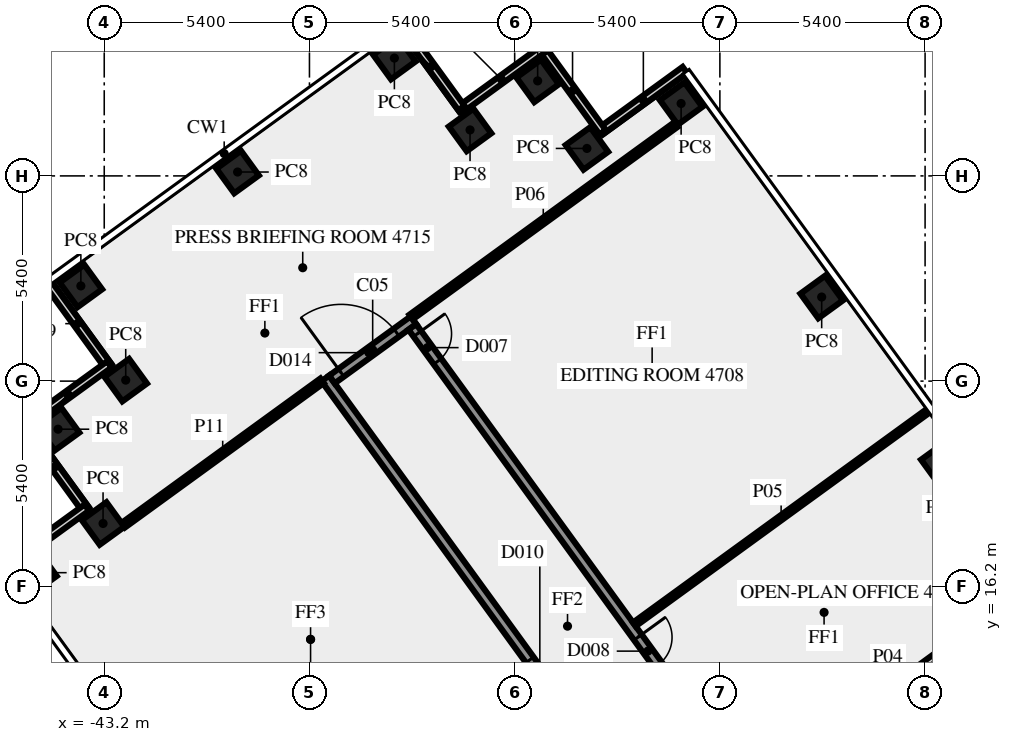
"""IFC4 building model, lengths in metres.
Left out: names, types, materials, properties, quantities, classifications, styles, units other than length and angle.
Written with IfcOpenShell. Run it as: python <this file> out.ifc"""

import sys

from ifc_helpers import new_model, si_unit, direction, frame, frame_2d, origin, origin_2d, place, context, subcontext, project, spatial, rectangle, extrude, element, fill, save


model = new_model("IFC4")
c1 = context("Model", 3, precision=1e-05, world=origin(), true_north=direction((0.0, 1.0)))
c2 = subcontext(c1, "Body", "Model", "MODEL_VIEW")
j1 = project(units=[si_unit("LENGTHUNIT", "METRE"), si_unit("PLANEANGLEUNIT", "RADIAN")], contexts=[c1])
p1 = place(None, origin())
s1 = spatial("IfcSite", under=j1, at=p1, CompositionType="ELEMENT")
p2 = place(p1, origin())
s2 = spatial("IfcBuilding", under=s1, at=p2, CompositionType="ELEMENT")
p3 = place(p2, frame((0.0, 0.0, 202.0)))
s3 = spatial("IfcBuildingStorey", under=s2, at=p3, CompositionType="ELEMENT", Elevation=202.0)
for number, where, z_axis, x_axis in (
    (1, (-21.147, 19.444, 0.0), (0.0, 0.0, 1.0), (-0.588, 0.809, 0.0)),
    (2, (-24.321, 23.812, 0.0), (0.0, 0.0, 1.0), (-0.588, 0.809, 0.0)),
    (3, (-28.02, 28.905, 0.0), (0.0, 0.0, 1.0), (-0.809, -0.588, 0.0)),
    (4, (-30.499, 27.723, 0.0), (0.0, 0.0, 1.0), (-0.809, -0.588, 0.0)),
    (5, (-31.795, 29.5, 0.0), (0.0, 0.0, 1.0), (-0.588, 0.809, 0.0)),
    (6, (-33.574, 28.209, 0.0), (0.0, 0.0, 1.0), (-0.588, 0.809, 0.0)),
    (7, (-35.565, 30.1, 0.0), (0.0, 0.0, 1.0), (-0.809, -0.588, 0.0)),
    (8, (-39.691, 27.102, 0.0), (0.0, 0.0, 1.0), (-0.809, -0.588, 0.0)),
    (9, (-43.815, 24.105, 0.0), (0.0, 0.0, 1.0), (-0.809, -0.588, 0.0)),
    (10, (-42.635, 21.626, 0.0), (0.0, 0.0, 1.0), (-0.809, -0.588, 0.0)),
    (11, (-44.415, 20.335, 0.0), (0.0, 0.0, 1.0), (0.588, -0.809, 0.0)),
    (12, (-43.231, 17.854, 0.0), (0.0, 0.0, 1.0), (0.588, -0.809, 0.0)),
    (13, (-45.01, 16.56, 0.0), (0.0, 0.0, 1.0), (0.588, -0.809, 0.0)),
):
    element("IfcColumn", number, at=place(p3, frame(where, z_axis=z_axis, x_axis=x_axis)), inside=s3, PredefinedType="COLUMN", context=c2, shape_type="SweptSolid", body=[
        extrude(rectangle(XDim=0.8, YDim=0.8, at=origin_2d()), origin(), (0.0, 0.0, 1.0), 3.65),
    ])
for number, where, z_axis, x_axis in (
    (14, (-27.921, 29.787, 0.0), (0.0, 0.0, 1.0), (-0.809, -0.588, 0.0)),
    (15, (-30.083, 28.149, 0.0), (0.0, 0.0, 1.0), (-0.588, 0.809, 0.0)),
    (16, (-31.654, 30.331, 0.0), (0.0, 0.0, 1.0), (-0.809, -0.588, 0.0)),
    (17, (-33.801, 28.786, 0.0), (0.0, 0.0, 1.0), (-0.588, 0.809, 0.0)),
    (18, (-44.699, 24.205, 0.0), (0.0, 0.0, 1.0), (0.588, -0.809, 0.0)),
    (19, (-43.061, 22.043, 0.0), (0.0, 0.0, 1.0), (-0.809, -0.588, 0.0)),
    (20, (-45.296, 20.434, 0.0), (0.0, 0.0, 1.0), (0.588, -0.809, 0.0)),
    (21, (-43.658, 18.272, 0.0), (0.0, 0.0, 1.0), (-0.809, -0.588, 0.0)),
):
    element("IfcWall", number, at=place(p3, frame(where, z_axis=z_axis, x_axis=x_axis)), inside=s3, PredefinedType="SOLIDWALL", context=c2, shape_type="SweptSolid", body=[
        extrude(rectangle(XDim=2.7, YDim=0.2, at=frame_2d((1.35, 0.0))), origin(), (0.0, 0.0, 1.0), 3.65),
    ])
p4 = place(p3, frame((-20.531, -1.523, 0.0), z_axis=(0.0, 0.0, 1.0), x_axis=(-0.587785812891, 0.809016587076, 0.0)))
e22 = element("IfcWall", 22, at=p4, inside=s3, PredefinedType="SOLIDWALL", context=c2, shape_type="SweptSolid", body=[
    extrude(rectangle(XDim=28.67, YDim=0.25, at=frame_2d((14.335, 0.0))), origin(), (0.0, 0.0, 1.0), 3.65),
])
p5 = place(p4, frame((17.015, 0.0, 0.0)))
e23 = element("IfcOpeningElement", 23, at=p5, cuts=e22, PredefinedType="OPENING", context=c2, shape_type="SweptSolid", body=[
    extrude(rectangle(XDim=0.9, YDim=2.1, at=frame_2d((0.45, 1.05))), frame((0.0, 0.135, 0.0), z_axis=(0.0, -1.0, 0.0), x_axis=(1.0, 0.0, 0.0)), (0.0, 0.0, 1.0), 0.27),
])
p6 = place(p4, frame((8.916, 0.0, 0.0)))
e24 = element("IfcOpeningElement", 24, at=p6, cuts=e22, PredefinedType="OPENING", context=c2, shape_type="SweptSolid", body=[
    extrude(rectangle(XDim=0.9, YDim=2.1, at=frame_2d((0.45, 1.05))), frame((0.0, 0.135, 0.0), z_axis=(0.0, -1.0, 0.0), x_axis=(1.0, 0.0, 0.0)), (0.0, 0.0, 1.0), 0.27),
])
p7 = place(p4, frame((18.616, 0.0, 0.0)))
e25 = element("IfcOpeningElement", 25, at=p7, cuts=e22, PredefinedType="OPENING", context=c2, shape_type="SweptSolid", body=[
    extrude(rectangle(XDim=0.9, YDim=2.1, at=frame_2d((0.45, 1.05))), frame((0.0, 0.135, 0.0), z_axis=(0.0, -1.0, 0.0), x_axis=(1.0, 0.0, 0.0)), (0.0, 0.0, 1.0), 0.27),
])
p8 = place(p4, frame((11.615, 0.0, 0.0)))
e26 = element("IfcOpeningElement", 26, at=p8, cuts=e22, PredefinedType="OPENING", context=c2, shape_type="SweptSolid", body=[
    extrude(rectangle(XDim=0.9, YDim=2.1, at=frame_2d((0.45, 1.05))), frame((0.0, 0.135, 0.0), z_axis=(0.0, -1.0, 0.0), x_axis=(1.0, 0.0, 0.0)), (0.0, 0.0, 1.0), 0.27),
])
p9 = place(p3, frame((-37.208, 21.644, 0.0), z_axis=(0.0, 0.0, 1.0), x_axis=(0.809038743598, 0.587755315891, 0.0)))
e27 = element("IfcWall", 27, at=p9, inside=s3, PredefinedType="SOLIDWALL", context=c2, shape_type="SweptSolid", body=[
    extrude(rectangle(XDim=2.65, YDim=0.25, at=frame_2d((1.325, 0.0))), origin(), (0.0, 0.0, 1.0), 3.65),
])
p10 = place(p9, frame((0.3, 0.0, 0.0)))
e28 = element("IfcOpeningElement", 28, at=p10, cuts=e27, PredefinedType="OPENING", context=c2, shape_type="SweptSolid", body=[
    extrude(rectangle(XDim=1.8, YDim=2.1, at=frame_2d((0.9, 1.05))), frame((0.0, 0.135, 0.0), z_axis=(0.0, -1.0, 0.0), x_axis=(1.0, 0.0, 0.0)), (0.0, 0.0, 1.0), 0.27),
])
p11 = place(p3, frame((-35.092, 23.027, 0.0), z_axis=(0.0, 0.0, 1.0), x_axis=(0.587784076945, -0.809017848313, 0.0)))
e29 = element("IfcWall", 29, at=p11, inside=s3, PredefinedType="SOLIDWALL", context=c2, shape_type="SweptSolid", body=[
    extrude(rectangle(XDim=29.853, YDim=0.25, at=frame_2d((14.927, 0.0))), origin(), (0.0, 0.0, 1.0), 3.65),
])
p12 = place(p11, frame((10.095, 0.0, 0.0)))
e30 = element("IfcOpeningElement", 30, at=p12, cuts=e29, PredefinedType="OPENING", context=c2, shape_type="SweptSolid", body=[
    extrude(rectangle(XDim=0.9, YDim=2.1, at=frame_2d((0.45, 1.05))), frame((0.0, 0.135, 0.0), z_axis=(0.0, -1.0, 0.0), x_axis=(1.0, 0.0, 0.0)), (0.0, 0.0, 1.0), 0.27),
])
p13 = place(p11, frame((15.495, 0.0, 0.0)))
e31 = element("IfcOpeningElement", 31, at=p13, cuts=e29, PredefinedType="OPENING", context=c2, shape_type="SweptSolid", body=[
    extrude(rectangle(XDim=0.9, YDim=2.1, at=frame_2d((0.45, 1.05))), frame((0.0, 0.135, 0.0), z_axis=(0.0, -1.0, 0.0), x_axis=(1.0, 0.0, 0.0)), (0.0, 0.0, 1.0), 0.27),
])
p14 = place(p11, frame((0.224, 0.0, 0.0)))
e32 = element("IfcOpeningElement", 32, at=p14, cuts=e29, PredefinedType="OPENING", context=c2, shape_type="SweptSolid", body=[
    extrude(rectangle(XDim=0.9, YDim=2.1, at=frame_2d((0.45, 1.05))), frame((0.0, 0.135, 0.0), z_axis=(0.0, -1.0, 0.0), x_axis=(1.0, 0.0, 0.0)), (0.0, 0.0, 1.0), 0.27),
])
p15 = place(p3, frame((-26.089, 10.848, 0.0), z_axis=(0.0, 0.0, 1.0), x_axis=(0.807661302092, 0.589646691759, 0.0)))
e33 = element("IfcWall", 33, at=p15, inside=s3, PredefinedType="SOLIDWALL", context=c2, shape_type="SweptSolid", body=[
    extrude(rectangle(XDim=9.55, YDim=0.2, at=frame_2d((4.775, 0.0))), origin(), (0.0, 0.0, 1.0), 2.85),
])
p16 = place(p3, frame((-21.525, 20.813, 0.0), z_axis=(0.0, 0.0, 1.0), x_axis=(-0.808994684961, -0.587815957341, 0.0)))
e34 = element("IfcWall", 34, at=p16, inside=s3, PredefinedType="PARTITIONING", context=c2, shape_type="SweptSolid", body=[
    extrude(rectangle(XDim=9.55, YDim=0.12, at=frame_2d((4.775, 0.0))), origin(), (0.0, 0.0, 1.0), 2.85),
])
p17 = place(p3, frame((-28.168, 28.341, 0.0), z_axis=(0.0, 0.0, 1.0), x_axis=(-0.809030614944, -0.58776650473, 0.0)))
e35 = element("IfcWall", 35, at=p17, inside=s3, PredefinedType="PARTITIONING", context=c2, shape_type="SweptSolid", body=[
    extrude(rectangle(XDim=8.6, YDim=0.15, at=frame_2d((4.3, 0.0))), origin(), (0.0, 0.0, 1.0), 3.65),
])
p18 = place(p3, frame((-42.698, 17.81, 0.0), z_axis=(0.0, 0.0, 1.0), x_axis=(0.80901688725, 0.587785399737, 0.0)))
e36 = element("IfcWall", 36, at=p18, inside=s3, PredefinedType="PARTITIONING", context=c2, shape_type="SweptSolid", body=[
    extrude(rectangle(XDim=6.465, YDim=0.15, at=frame_2d((3.232, 0.0))), origin(), (0.0, 0.0, 1.0), 3.65),
])
p19 = place(p12, origin())
e37 = element("IfcDoor", 37, at=p19, inside=s3, OperationType="SINGLE_SWING_LEFT", PredefinedType="DOOR", context=c2, shape_type="SweptSolid", body=[
    extrude(rectangle(XDim=0.9, YDim=2.1, at=frame_2d((0.45, 1.05))), frame((0.0, 0.025, 0.0), z_axis=(0.0, -1.0, 0.0), x_axis=(1.0, 0.0, 0.0)), (0.0, 0.0, 1.0), 0.05),
])
fill(e30, e37)
p20 = place(p14, origin())
e38 = element("IfcDoor", 38, at=p20, inside=s3, OperationType="SINGLE_SWING_LEFT", PredefinedType="DOOR", context=c2, shape_type="SweptSolid", body=[
    extrude(rectangle(XDim=0.9, YDim=2.1, at=frame_2d((0.45, 1.05))), frame((0.0, 0.025, 0.0), z_axis=(0.0, -1.0, 0.0), x_axis=(1.0, 0.0, 0.0)), (0.0, 0.0, 1.0), 0.05),
])
fill(e32, e38)
p21 = place(p10, origin())
e39 = element("IfcDoor", 39, at=p21, inside=s3, OperationType="DOUBLE_DOOR_SINGLE_SWING", PredefinedType="DOOR", context=c2, shape_type="SweptSolid", body=[
    extrude(rectangle(XDim=1.8, YDim=2.1, at=frame_2d((0.9, 1.05))), frame((0.0, 0.025, 0.0), z_axis=(0.0, -1.0, 0.0), x_axis=(1.0, 0.0, 0.0)), (0.0, 0.0, 1.0), 0.05),
])
fill(e28, e39)
p22 = place(p7, origin())
e40 = element("IfcDoor", 40, at=p22, inside=s3, OperationType="SINGLE_SWING_LEFT", PredefinedType="DOOR", context=c2, shape_type="SweptSolid", body=[
    extrude(rectangle(XDim=0.9, YDim=2.1, at=frame_2d((0.45, 1.05))), frame((0.0, 0.025, 0.0), z_axis=(0.0, -1.0, 0.0), x_axis=(1.0, 0.0, 0.0)), (0.0, 0.0, 1.0), 0.05),
])
fill(e25, e40)
save(model, sys.argv[1])
